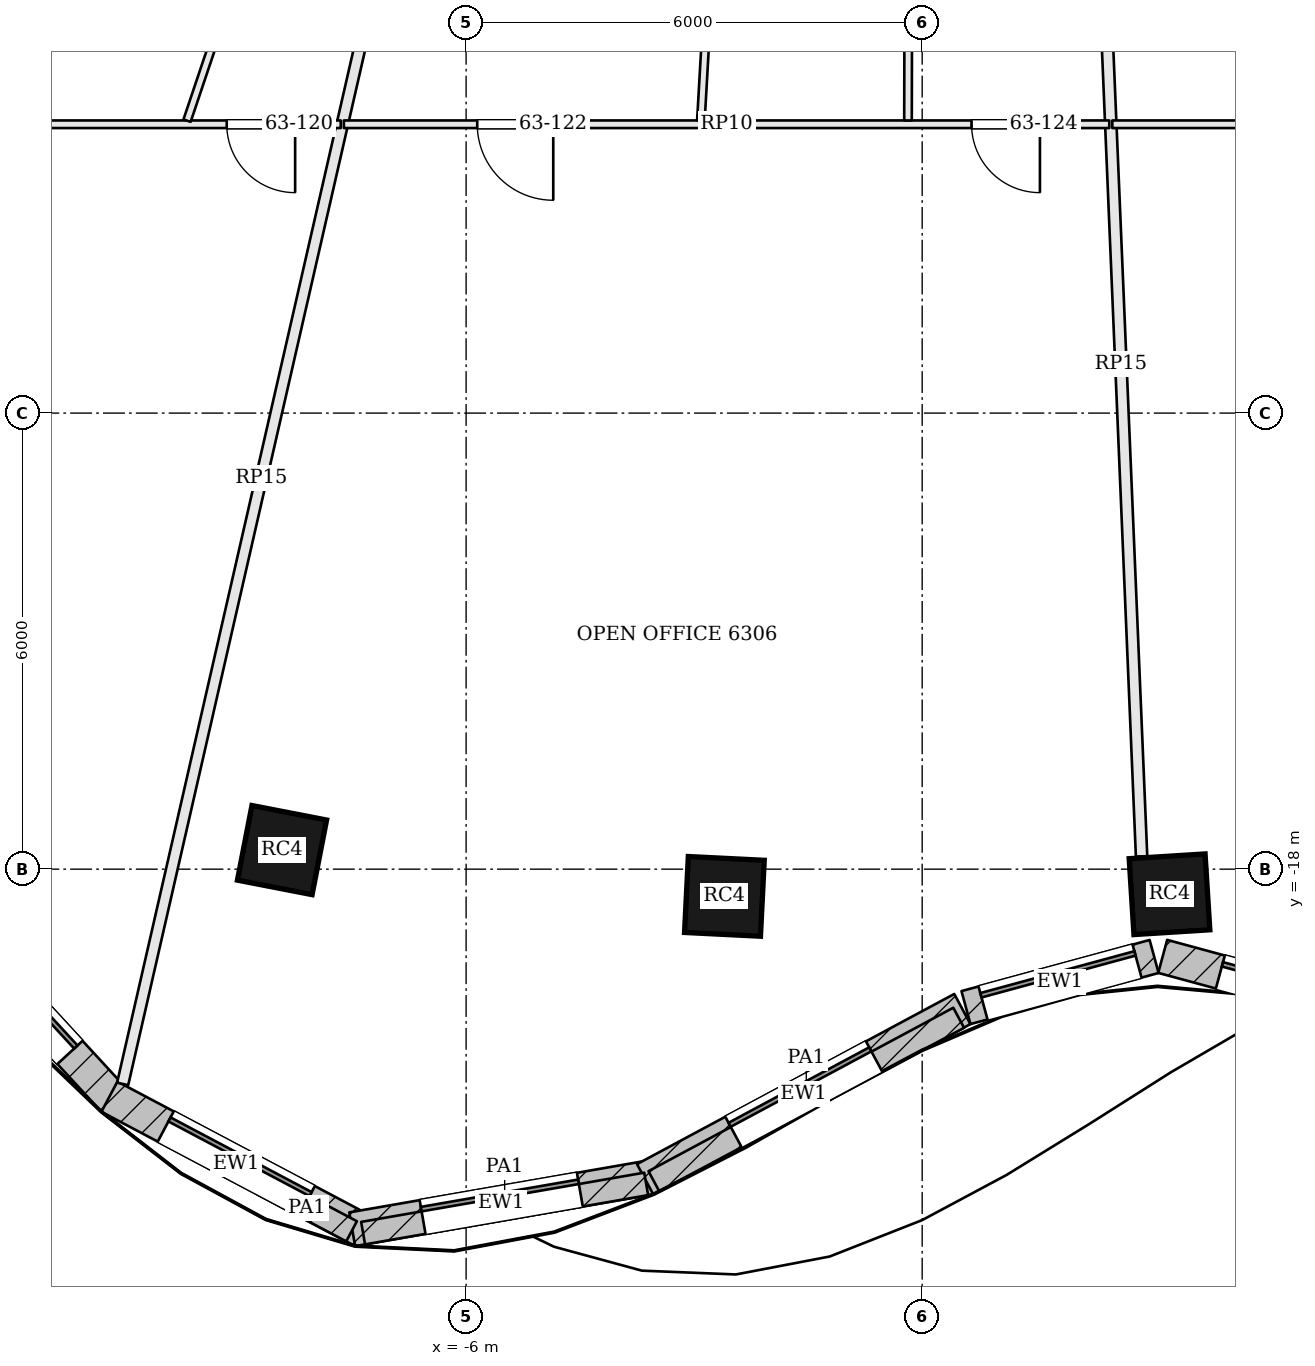
"""IFC4 building model, lengths in metres.
Left out: names, types, materials, properties, quantities, classifications, styles, units other than length and angle.
Written with IfcOpenShell. Run it as: python <this file> out.ifc"""

import sys

from ifc_helpers import new_model, si_unit, direction, frame, frame_2d, origin, origin_2d, place, context, subcontext, project, spatial, rectangle, extrude, element, fill, save


model = new_model("IFC4")
c1 = context("Model", 3, precision=1e-05, world=origin(), true_north=direction((0.0, 1.0)))
c2 = subcontext(c1, "Body", "Model", "MODEL_VIEW")
j1 = project(units=[si_unit("LENGTHUNIT", "METRE"), si_unit("PLANEANGLEUNIT", "RADIAN")], contexts=[c1])
p1 = place(None, origin())
s1 = spatial("IfcSite", under=j1, at=p1, CompositionType="ELEMENT")
p2 = place(p1, origin())
s2 = spatial("IfcBuilding", under=s1, at=p2, CompositionType="ELEMENT")
p3 = place(p2, frame((0.0, 0.0, 256.5)))
s3 = spatial("IfcBuildingStorey", under=s2, at=p3, CompositionType="ELEMENT", Elevation=256.5)
for number, where, z_axis, x_axis in (
    (1, (-8.422, -17.749, 0.0), (0.0, 0.0, 1.0), (0.982, -0.191, 0.0)),
    (2, (-2.602, -18.358, 0.0), (0.0, 0.0, 1.0), (0.999, -0.05, 0.0)),
    (3, (3.254, -18.33, 0.0), (0.0, 0.0, 1.0), (0.998, 0.063, 0.0)),
):
    element("IfcColumn", number, at=place(p3, frame(where, z_axis=z_axis, x_axis=x_axis)), inside=s3, PredefinedType="COLUMN", context=c2, shape_type="SweptSolid", body=[
        extrude(rectangle(XDim=1.0, YDim=1.0, at=origin_2d()), origin(), (0.0, 0.0, 1.0), 3.9),
    ])
p4 = place(p3, frame((-13.209, -18.243, 0.0), z_axis=(0.0, 0.0, 1.0), x_axis=(0.677612152497, -0.735419452278, 0.0)))
e4 = element("IfcWall", 4, at=p4, inside=s3, PredefinedType="SOLIDWALL", context=c2, shape_type="SweptSolid", body=[
    extrude(rectangle(XDim=3.797, YDim=0.45, at=frame_2d((1.898, 0.0))), origin(), (0.0, 0.0, 1.0), 3.7),
])
p5 = place(p4, frame((0.848, 0.0, 0.9)))
e5 = element("IfcOpeningElement", 5, at=p5, cuts=e4, PredefinedType="OPENING", context=c2, shape_type="SweptSolid", body=[
    extrude(rectangle(XDim=2.1, YDim=2.3, at=frame_2d((1.05, 1.15))), frame((0.0, 0.235, 0.0), z_axis=(0.0, -1.0, 0.0), x_axis=(1.0, 0.0, 0.0)), (0.0, 0.0, 1.0), 0.47),
])
p6 = place(p3, frame((-10.693, -20.993, 0.0), z_axis=(0.0, 0.0, 1.0), x_axis=(0.883817790726, -0.46783128668, 0.0)))
e6 = element("IfcWall", 6, at=p6, inside=s3, PredefinedType="SOLIDWALL", context=c2, shape_type="SweptSolid", body=[
    extrude(rectangle(XDim=3.777, YDim=0.45, at=frame_2d((1.888, 0.0))), origin(), (0.0, 0.0, 1.0), 3.7),
])
p7 = place(p6, frame((0.838, 0.0, 0.9)))
e7 = element("IfcOpeningElement", 7, at=p7, cuts=e6, PredefinedType="OPENING", context=c2, shape_type="SweptSolid", body=[
    extrude(rectangle(XDim=2.1, YDim=2.3, at=frame_2d((1.05, 1.15))), frame((0.0, 0.235, 0.0), z_axis=(0.0, -1.0, 0.0), x_axis=(1.0, 0.0, 0.0)), (0.0, 0.0, 1.0), 0.47),
])
p8 = place(p3, frame((-7.499, -22.737, 0.0), z_axis=(0.0, 0.0, 1.0), x_axis=(0.98521220506, 0.171338585849, 0.0)))
e8 = element("IfcWall", 8, at=p8, inside=s3, PredefinedType="SOLIDWALL", context=c2, shape_type="SweptSolid", body=[
    extrude(rectangle(XDim=3.98, YDim=0.45, at=frame_2d((1.99, 0.0))), origin(), (0.0, 0.0, 1.0), 3.7),
])
p9 = place(p8, frame((0.94, 0.0, 0.9)))
e9 = element("IfcOpeningElement", 9, at=p9, cuts=e8, PredefinedType="OPENING", context=c2, shape_type="SweptSolid", body=[
    extrude(rectangle(XDim=2.1, YDim=2.3, at=frame_2d((1.05, 1.15))), frame((0.0, 0.235, 0.0), z_axis=(0.0, -1.0, 0.0), x_axis=(1.0, 0.0, 0.0)), (0.0, 0.0, 1.0), 0.47),
])
p10 = place(p3, frame((-3.646, -22.079, 0.0), z_axis=(0.0, 0.0, 1.0), x_axis=(0.881279133897, 0.472596115259, 0.0)))
e10 = element("IfcWall", 10, at=p10, inside=s3, PredefinedType="SOLIDWALL", context=c2, shape_type="SweptSolid", body=[
    extrude(rectangle(XDim=4.737, YDim=0.45, at=frame_2d((2.368, 0.0))), origin(), (0.0, 0.0, 1.0), 3.7),
])
p11 = place(p10, frame((1.318, 0.0, 0.9)))
e11 = element("IfcOpeningElement", 11, at=p11, cuts=e10, PredefinedType="OPENING", context=c2, shape_type="SweptSolid", body=[
    extrude(rectangle(XDim=2.1, YDim=2.3, at=frame_2d((1.05, 1.15))), frame((0.0, 0.235, 0.0), z_axis=(0.0, -1.0, 0.0), x_axis=(1.0, 0.0, 0.0)), (0.0, 0.0, 1.0), 0.47),
])
p12 = place(p3, frame((0.576, -19.821, 0.0), z_axis=(0.0, 0.0, 1.0), x_axis=(0.965009398019, 0.262215296532, 0.0)))
e12 = element("IfcWall", 12, at=p12, inside=s3, PredefinedType="SOLIDWALL", context=c2, shape_type="SweptSolid", body=[
    extrude(rectangle(XDim=2.565, YDim=0.45, at=frame_2d((1.283, 0.0))), origin(), (0.0, 0.0, 1.0), 3.7),
])
p13 = place(p12, frame((0.233, 0.0, 0.9)))
e13 = element("IfcOpeningElement", 13, at=p13, cuts=e12, PredefinedType="OPENING", context=c2, shape_type="SweptSolid", body=[
    extrude(rectangle(XDim=2.1, YDim=2.3, at=frame_2d((1.05, 1.15))), frame((0.0, 0.235, 0.0), z_axis=(0.0, -1.0, 0.0), x_axis=(1.0, 0.0, 0.0)), (0.0, 0.0, 1.0), 0.47),
])
p14 = place(p3, frame((3.164, -19.147, 0.0), z_axis=(0.0, 0.0, 1.0), x_axis=(0.965039479998, -0.262104563191, 0.0)))
e14 = element("IfcWall", 14, at=p14, inside=s3, PredefinedType="SOLIDWALL", context=c2, shape_type="SweptSolid", body=[
    extrude(rectangle(XDim=3.672, YDim=0.45, at=frame_2d((1.836, 0.0))), origin(), (0.0, 0.0, 1.0), 3.7),
])
p15 = place(p14, frame((0.786, 0.0, 0.9)))
e15 = element("IfcOpeningElement", 15, at=p15, cuts=e14, PredefinedType="OPENING", context=c2, shape_type="SweptSolid", body=[
    extrude(rectangle(XDim=2.1, YDim=2.3, at=frame_2d((1.05, 1.15))), frame((0.0, 0.235, 0.0), z_axis=(0.0, -1.0, 0.0), x_axis=(1.0, 0.0, 0.0)), (0.0, 0.0, 1.0), 0.47),
])
p16 = place(p3, frame((-8.682, -22.143, 3.9), z_axis=(0.0, 0.0, 1.0), x_axis=(0.883787916347, -0.467887720419, 0.0)))
e16 = element("IfcWall", 16, at=p16, inside=s3, PredefinedType="PARAPET", context=c2, shape_type="SweptSolid", body=[
    extrude(rectangle(XDim=1.329, YDim=0.3, at=frame_2d((0.665, 0.0))), origin(), (0.0, 0.0, 1.0), 1.1),
])
p17 = place(p3, frame((-7.355, -22.789, 3.9), z_axis=(0.0, 0.0, 1.0), x_axis=(0.985197529684, 0.171422949176, 0.0)))
e17 = element("IfcWall", 17, at=p17, inside=s3, PredefinedType="PARAPET", context=c2, shape_type="SweptSolid", body=[
    extrude(rectangle(XDim=3.78, YDim=0.3, at=frame_2d((1.89, 0.0))), origin(), (0.0, 0.0, 1.0), 1.1),
])
p18 = place(p3, frame((-3.53, -22.106, 3.9), z_axis=(0.0, 0.0, 1.0), x_axis=(0.881258931682, 0.472633785643, 0.0)))
e18 = element("IfcWall", 18, at=p18, inside=s3, PredefinedType="PARAPET", context=c2, shape_type="SweptSolid", body=[
    extrude(rectangle(XDim=4.55, YDim=0.3, at=frame_2d((2.275, 0.0))), origin(), (0.0, 0.0, 1.0), 1.1),
])
p19 = place(p3, frame((-10.519, -20.825, 0.0), z_axis=(0.0, 0.0, 1.0), x_axis=(0.223124554472, 0.974789943112, 0.0)))
e19 = element("IfcWall", 19, at=p19, inside=s3, PredefinedType="PARTITIONING", context=c2, shape_type="SweptSolid", body=[
    extrude(rectangle(XDim=16.365, YDim=0.15, at=frame_2d((8.182, 0.0))), origin(), (0.0, 0.0, 1.0), 3.084),
])
p20 = place(p3, frame((2.887, -17.832, 0.0), z_axis=(0.0, 0.0, 1.0), x_axis=(-0.042037723884, 0.999116024179, 0.0)))
e20 = element("IfcWall", 20, at=p20, inside=s3, PredefinedType="PARTITIONING", context=c2, shape_type="SweptSolid", body=[
    extrude(rectangle(XDim=12.969, YDim=0.15, at=frame_2d((6.484, 0.0))), origin(), (0.0, 0.0, 1.0), 3.084),
])
p21 = place(p3, frame((-7.649, -8.2, 0.0), z_axis=(0.0, 0.0, 1.0), x_axis=(-1.0, 0.0, 0.0)))
e21 = element("IfcWall", 21, at=p21, inside=s3, PredefinedType="PARTITIONING", context=c2, shape_type="SweptSolid", body=[
    extrude(rectangle(XDim=10.5, YDim=0.1, at=frame_2d((5.25, 0.0))), origin(), (0.0, 0.0, 1.0), 3.084),
])
p22 = place(p21, frame((0.6, 0.0, 0.0)))
e22 = element("IfcOpeningElement", 22, at=p22, cuts=e21, PredefinedType="OPENING", context=c2, shape_type="SweptSolid", body=[
    extrude(rectangle(XDim=0.9, YDim=2.1, at=frame_2d((0.45, 1.05))), frame((0.0, 0.06, 0.0), z_axis=(0.0, -1.0, 0.0), x_axis=(1.0, 0.0, 0.0)), (0.0, 0.0, 1.0), 0.12),
])
p23 = place(p3, frame((-8.567, -4.871, 0.0), z_axis=(0.0, 0.0, 1.0), x_axis=(-0.319060884331, -0.947734220175, 0.0)))
e23 = element("IfcWall", 23, at=p23, inside=s3, PredefinedType="PARTITIONING", context=c2, shape_type="SweptSolid", body=[
    extrude(rectangle(XDim=3.462, YDim=0.1, at=frame_2d((1.731, 0.0))), origin(), (0.0, 0.0, 1.0), 3.084),
])
p24 = place(p3, frame((2.461, -8.2, 0.0), z_axis=(0.0, 0.0, 1.0), x_axis=(-1.0, 0.0, 0.0)))
e24 = element("IfcWall", 24, at=p24, inside=s3, PredefinedType="PARTITIONING", context=c2, shape_type="SweptSolid", body=[
    extrude(rectangle(XDim=10.07, YDim=0.1, at=frame_2d((5.035, 0.0))), origin(), (0.0, 0.0, 1.0), 3.084),
])
p25 = place(p24, frame((7.315, 0.0, 0.0)))
e25 = element("IfcOpeningElement", 25, at=p25, cuts=e24, PredefinedType="OPENING", context=c2, shape_type="SweptSolid", body=[
    extrude(rectangle(XDim=1.0, YDim=2.1, at=frame_2d((0.5, 1.05))), frame((0.0, 0.06, 0.0), z_axis=(0.0, -1.0, 0.0), x_axis=(1.0, 0.0, 0.0)), (0.0, 0.0, 1.0), 0.12),
])
p26 = place(p24, frame((0.912, 0.0, 0.0)))
e26 = element("IfcOpeningElement", 26, at=p26, cuts=e24, PredefinedType="OPENING", context=c2, shape_type="SweptSolid", body=[
    extrude(rectangle(XDim=0.9, YDim=2.1, at=frame_2d((0.45, 1.05))), frame((0.0, 0.06, 0.0), z_axis=(0.0, -1.0, 0.0), x_axis=(1.0, 0.0, 0.0)), (0.0, 0.0, 1.0), 0.12),
])
p27 = place(p3, frame((-2.725, -4.875, 0.0), z_axis=(0.0, 0.0, 1.0), x_axis=(-0.056710673049, -0.998390654785, 0.0)))
e27 = element("IfcWall", 27, at=p27, inside=s3, PredefinedType="PARTITIONING", context=c2, shape_type="SweptSolid", body=[
    extrude(rectangle(XDim=3.281, YDim=0.1, at=frame_2d((1.64, 0.0))), origin(), (0.0, 0.0, 1.0), 3.084),
])
p28 = place(p3, frame((-0.179, -4.875, 0.0), z_axis=(0.0, 0.0, 1.0), x_axis=(-0.00238556053, -0.999997154546, 0.0)))
e28 = element("IfcWall", 28, at=p28, inside=s3, PredefinedType="PARTITIONING", context=c2, shape_type="SweptSolid", body=[
    extrude(rectangle(XDim=3.275, YDim=0.1, at=frame_2d((1.637, 0.0))), origin(), (0.0, 0.0, 1.0), 3.084),
])
p29 = place(p3, frame((12.372, -8.2, 0.0), z_axis=(0.0, 0.0, 1.0), x_axis=(-1.0, 0.0, 0.0)))
e29 = element("IfcWall", 29, at=p29, inside=s3, PredefinedType="PARTITIONING", context=c2, shape_type="SweptSolid", body=[
    extrude(rectangle(XDim=9.871, YDim=0.1, at=frame_2d((4.936, 0.0))), origin(), (0.0, 0.0, 1.0), 3.084),
])
p30 = place(p29, frame((6.604, 0.0, 0.0)))
e30 = element("IfcOpeningElement", 30, at=p30, cuts=e29, PredefinedType="OPENING", context=c2, shape_type="SweptSolid", body=[
    extrude(rectangle(XDim=1.0, YDim=2.1, at=frame_2d((0.5, 1.05))), frame((0.0, 0.06, 0.0), z_axis=(0.0, -1.0, 0.0), x_axis=(1.0, 0.0, 0.0)), (0.0, 0.0, 1.0), 0.12),
])
p31 = place(p5, origin())
e31 = element("IfcWindow", 31, at=p31, inside=s3, PartitioningType="SINGLE_PANEL", PredefinedType="WINDOW", context=c2, shape_type="SweptSolid", body=[
    extrude(rectangle(XDim=2.1, YDim=2.3, at=frame_2d((1.05, 1.15))), frame((0.0, 0.135, 0.0), z_axis=(0.0, -1.0, 0.0), x_axis=(1.0, 0.0, 0.0)), (0.0, 0.0, 1.0), 0.06),
])
fill(e5, e31)
p32 = place(p7, origin())
e32 = element("IfcWindow", 32, at=p32, inside=s3, PartitioningType="SINGLE_PANEL", PredefinedType="WINDOW", context=c2, shape_type="SweptSolid", body=[
    extrude(rectangle(XDim=2.1, YDim=2.3, at=frame_2d((1.05, 1.15))), frame((0.0, 0.135, 0.0), z_axis=(0.0, -1.0, 0.0), x_axis=(1.0, 0.0, 0.0)), (0.0, 0.0, 1.0), 0.06),
])
fill(e7, e32)
p33 = place(p9, origin())
e33 = element("IfcWindow", 33, at=p33, inside=s3, PartitioningType="SINGLE_PANEL", PredefinedType="WINDOW", context=c2, shape_type="SweptSolid", body=[
    extrude(rectangle(XDim=2.1, YDim=2.3, at=frame_2d((1.05, 1.15))), frame((0.0, 0.135, 0.0), z_axis=(0.0, -1.0, 0.0), x_axis=(1.0, 0.0, 0.0)), (0.0, 0.0, 1.0), 0.06),
])
fill(e9, e33)
p34 = place(p11, origin())
e34 = element("IfcWindow", 34, at=p34, inside=s3, PartitioningType="SINGLE_PANEL", PredefinedType="WINDOW", context=c2, shape_type="SweptSolid", body=[
    extrude(rectangle(XDim=2.1, YDim=2.3, at=frame_2d((1.05, 1.15))), frame((0.0, 0.135, 0.0), z_axis=(0.0, -1.0, 0.0), x_axis=(1.0, 0.0, 0.0)), (0.0, 0.0, 1.0), 0.06),
])
fill(e11, e34)
p35 = place(p13, origin())
e35 = element("IfcWindow", 35, at=p35, inside=s3, PartitioningType="SINGLE_PANEL", PredefinedType="WINDOW", context=c2, shape_type="SweptSolid", body=[
    extrude(rectangle(XDim=2.1, YDim=2.3, at=frame_2d((1.05, 1.15))), frame((0.0, 0.135, 0.0), z_axis=(0.0, -1.0, 0.0), x_axis=(1.0, 0.0, 0.0)), (0.0, 0.0, 1.0), 0.06),
])
fill(e13, e35)
p36 = place(p15, origin())
e36 = element("IfcWindow", 36, at=p36, inside=s3, PartitioningType="SINGLE_PANEL", PredefinedType="WINDOW", context=c2, shape_type="SweptSolid", body=[
    extrude(rectangle(XDim=2.1, YDim=2.3, at=frame_2d((1.05, 1.15))), frame((0.0, 0.135, 0.0), z_axis=(0.0, -1.0, 0.0), x_axis=(1.0, 0.0, 0.0)), (0.0, 0.0, 1.0), 0.06),
])
fill(e15, e36)
p37 = place(p22, origin())
e37 = element("IfcDoor", 37, at=p37, inside=s3, OperationType="SINGLE_SWING_LEFT", PredefinedType="DOOR", context=c2, shape_type="SweptSolid", body=[
    extrude(rectangle(XDim=0.9, YDim=2.1, at=frame_2d((0.45, 1.05))), frame((0.0, 0.025, 0.0), z_axis=(0.0, -1.0, 0.0), x_axis=(1.0, 0.0, 0.0)), (0.0, 0.0, 1.0), 0.05),
])
fill(e22, e37)
p38 = place(p25, origin())
e38 = element("IfcDoor", 38, at=p38, inside=s3, OperationType="SINGLE_SWING_LEFT", PredefinedType="DOOR", context=c2, shape_type="SweptSolid", body=[
    extrude(rectangle(XDim=1.0, YDim=2.1, at=frame_2d((0.5, 1.05))), frame((0.0, 0.025, 0.0), z_axis=(0.0, -1.0, 0.0), x_axis=(1.0, 0.0, 0.0)), (0.0, 0.0, 1.0), 0.05),
])
fill(e25, e38)
p39 = place(p26, origin())
e39 = element("IfcDoor", 39, at=p39, inside=s3, OperationType="SINGLE_SWING_LEFT", PredefinedType="DOOR", context=c2, shape_type="SweptSolid", body=[
    extrude(rectangle(XDim=0.9, YDim=2.1, at=frame_2d((0.45, 1.05))), frame((0.0, 0.025, 0.0), z_axis=(0.0, -1.0, 0.0), x_axis=(1.0, 0.0, 0.0)), (0.0, 0.0, 1.0), 0.05),
])
fill(e26, e39)
save(model, sys.argv[1])
